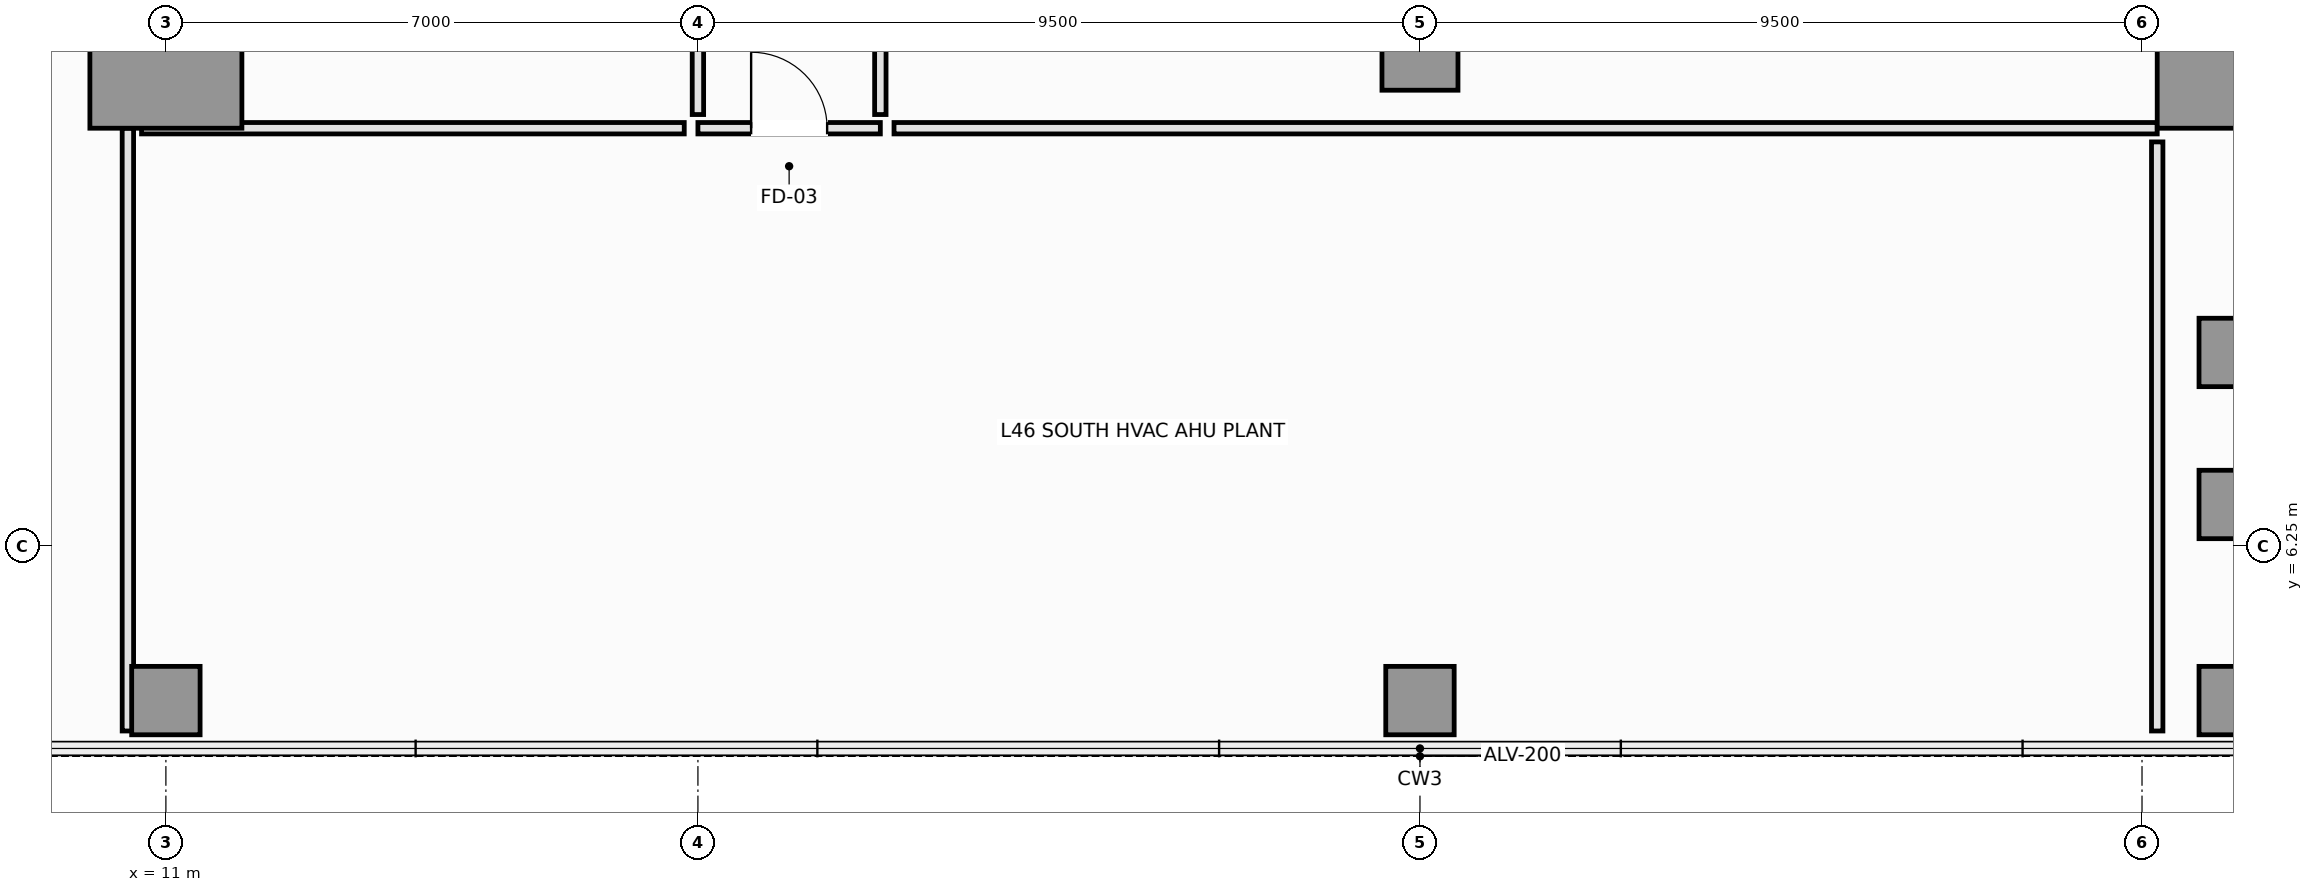
"""IFC4 building model, lengths in metres.
Left out: names, types, materials, properties, quantities, classifications, styles, units other than length and angle.
Written with IfcOpenShell. Run it as: python <this file> out.ifc"""

import sys

from ifc_helpers import new_model, si_unit, direction, frame, frame_2d, origin, origin_2d, place, context, subcontext, project, spatial, rectangle, extrude, element, fill, save


model = new_model("IFC4")
c1 = context("Model", 3, precision=1e-05, world=origin(), true_north=direction((0.0, 1.0)))
c2 = subcontext(c1, "Body", "Model", "MODEL_VIEW")
j1 = project(units=[si_unit("LENGTHUNIT", "METRE"), si_unit("PLANEANGLEUNIT", "RADIAN")], contexts=[c1])
p1 = place(None, origin())
s1 = spatial("IfcSite", under=j1, at=p1, CompositionType="ELEMENT")
p2 = place(p1, origin())
s2 = spatial("IfcBuilding", under=s1, at=p2, CompositionType="ELEMENT")
p3 = place(p2, frame((0.0, 0.0, 173.25)))
s3 = spatial("IfcBuildingStorey", under=s2, at=p3, CompositionType="ELEMENT", Elevation=173.25)
for number, where, z_axis, x_axis in (
    (1, (11.0, 12.75, 0.0), (0.0, 0.0, 1.0), (1.0, 0.0, 0.0)),
    (2, (38.2, 12.75, 0.0), (0.0, 0.0, 1.0), (1.0, 0.0, 0.0)),
):
    element("IfcColumn", number, at=place(p3, frame(where, z_axis=z_axis, x_axis=x_axis)), inside=s3, PredefinedType="COLUMN", context=c2, shape_type="SweptSolid", body=[
        extrude(rectangle(XDim=2.0, YDim=2.0, at=origin_2d()), origin(), (0.0, 0.0, 1.0), 4.8),
    ])
p4 = place(p3, frame((27.5, 12.75, 0.0), z_axis=(0.0, 0.0, 1.0), x_axis=(1.0, 0.0, 0.0)))
e3 = element("IfcColumn", 3, at=p4, inside=s3, PredefinedType="COLUMN", context=c2, shape_type="SweptSolid", body=[
    extrude(rectangle(XDim=1.0, YDim=1.0, at=origin_2d()), origin(), (0.0, 0.0, 1.0), 4.8),
])
for number, where, z_axis, x_axis in (
    (4, (38.2, 6.8, 0.0), (0.0, 0.0, 1.0), (1.0, 0.0, 0.0)),
    (5, (38.2, 8.8, 0.0), (0.0, 0.0, 1.0), (1.0, 0.0, 0.0)),
    (6, (11.0, 4.22, 0.0), (0.0, 0.0, 1.0), (1.0, 0.0, 0.0)),
    (7, (27.5, 4.22, 0.0), (0.0, 0.0, 1.0), (1.0, 0.0, 0.0)),
    (8, (38.2, 4.22, 0.0), (0.0, 0.0, 1.0), (1.0, 0.0, 0.0)),
):
    element("IfcColumn", number, at=place(p3, frame(where, z_axis=z_axis, x_axis=x_axis)), inside=s3, PredefinedType="COLUMN", context=c2, shape_type="SweptSolid", body=[
        extrude(rectangle(XDim=0.9, YDim=0.9, at=origin_2d()), origin(), (0.0, 0.0, 1.0), 4.8),
    ])
p5 = place(p3, frame((18.0, 11.75, 0.0), z_axis=(0.0, 0.0, 1.0), x_axis=(1.0, 0.0, 0.0)))
e9 = element("IfcWall", 9, at=p5, inside=s3, PredefinedType="PARTITIONING", context=c2, shape_type="SweptSolid", body=[
    extrude(rectangle(XDim=2.4, YDim=0.15, at=frame_2d((1.2, 0.0))), origin(), (0.0, 0.0, 1.0), 4.6),
])
p6 = place(p5, frame((0.7, 0.0, 0.0)))
e10 = element("IfcOpeningElement", 10, at=p6, cuts=e9, PredefinedType="OPENING", context=c2, shape_type="SweptSolid", body=[
    extrude(rectangle(XDim=1.0, YDim=2.15, at=frame_2d((0.5, 1.075))), frame((0.0, 0.085, 0.0), z_axis=(0.0, -1.0, 0.0), x_axis=(1.0, 0.0, 0.0)), (0.0, 0.0, 1.0), 0.17),
])
p7 = place(p3, frame((20.4, 13.52, 0.0), z_axis=(0.0, 0.0, 1.0), x_axis=(0.0, -1.0, 0.0)))
e11 = element("IfcWall", 11, at=p7, inside=s3, PredefinedType="PARTITIONING", context=c2, shape_type="SweptSolid", body=[
    extrude(rectangle(XDim=1.59, YDim=0.15, at=frame_2d((0.795, 0.0))), origin(), (0.0, 0.0, 1.0), 4.6),
])
p8 = place(p3, frame((20.58, 11.75, 0.0), z_axis=(0.0, 0.0, 1.0), x_axis=(1.0, 0.0, 0.0)))
e12 = element("IfcWall", 12, at=p8, inside=s3, PredefinedType="PARTITIONING", context=c2, shape_type="SweptSolid", body=[
    extrude(rectangle(XDim=16.62, YDim=0.15, at=frame_2d((8.31, 0.0))), origin(), (0.0, 0.0, 1.0), 4.6),
])
p9 = place(p3, frame((37.2, 11.57, 0.0), z_axis=(0.0, 0.0, 1.0), x_axis=(0.0, -1.0, 0.0)))
e13 = element("IfcWall", 13, at=p9, inside=s3, PredefinedType="PARTITIONING", context=c2, shape_type="SweptSolid", body=[
    extrude(rectangle(XDim=7.75, YDim=0.15, at=frame_2d((3.875, 0.0))), origin(), (0.0, 0.0, 1.0), 4.6),
])
p10 = place(p3, frame((10.5, 3.82, 0.0), z_axis=(0.0, 0.0, 1.0), x_axis=(0.0, 1.0, 0.0)))
e14 = element("IfcWall", 14, at=p10, inside=s3, PredefinedType="PARTITIONING", context=c2, shape_type="SweptSolid", body=[
    extrude(rectangle(XDim=7.93, YDim=0.15, at=frame_2d((3.965, 0.0))), origin(), (0.0, 0.0, 1.0), 2.6),
])
p11 = place(p3, frame((10.68, 11.75, 0.0), z_axis=(0.0, 0.0, 1.0), x_axis=(1.0, 0.0, 0.0)))
e15 = element("IfcWall", 15, at=p11, inside=s3, PredefinedType="PARTITIONING", context=c2, shape_type="SweptSolid", body=[
    extrude(rectangle(XDim=7.14, YDim=0.15, at=frame_2d((3.57, 0.0))), origin(), (0.0, 0.0, 1.0), 4.6),
])
p12 = place(p3, frame((18.0, 11.93, 0.0), z_axis=(0.0, 0.0, 1.0), x_axis=(0.0, 1.0, 0.0)))
e16 = element("IfcWall", 16, at=p12, inside=s3, PredefinedType="PARTITIONING", context=c2, shape_type="SweptSolid", body=[
    extrude(rectangle(XDim=1.85, YDim=0.15, at=frame_2d((0.925, 0.0))), origin(), (0.0, 0.0, 1.0), 4.6),
])
p13 = place(p6, origin())
e17 = element("IfcDoor", 17, at=p13, inside=s3, OperationType="SINGLE_SWING_LEFT", PredefinedType="DOOR", context=c2, shape_type="SweptSolid", body=[
    extrude(rectangle(XDim=1.0, YDim=2.15, at=frame_2d((0.5, 1.075))), frame((0.0, 0.025, 0.0), z_axis=(0.0, -1.0, 0.0), x_axis=(1.0, 0.0, 0.0)), (0.0, 0.0, 1.0), 0.05),
])
fill(e10, e17)
save(model, sys.argv[1])
